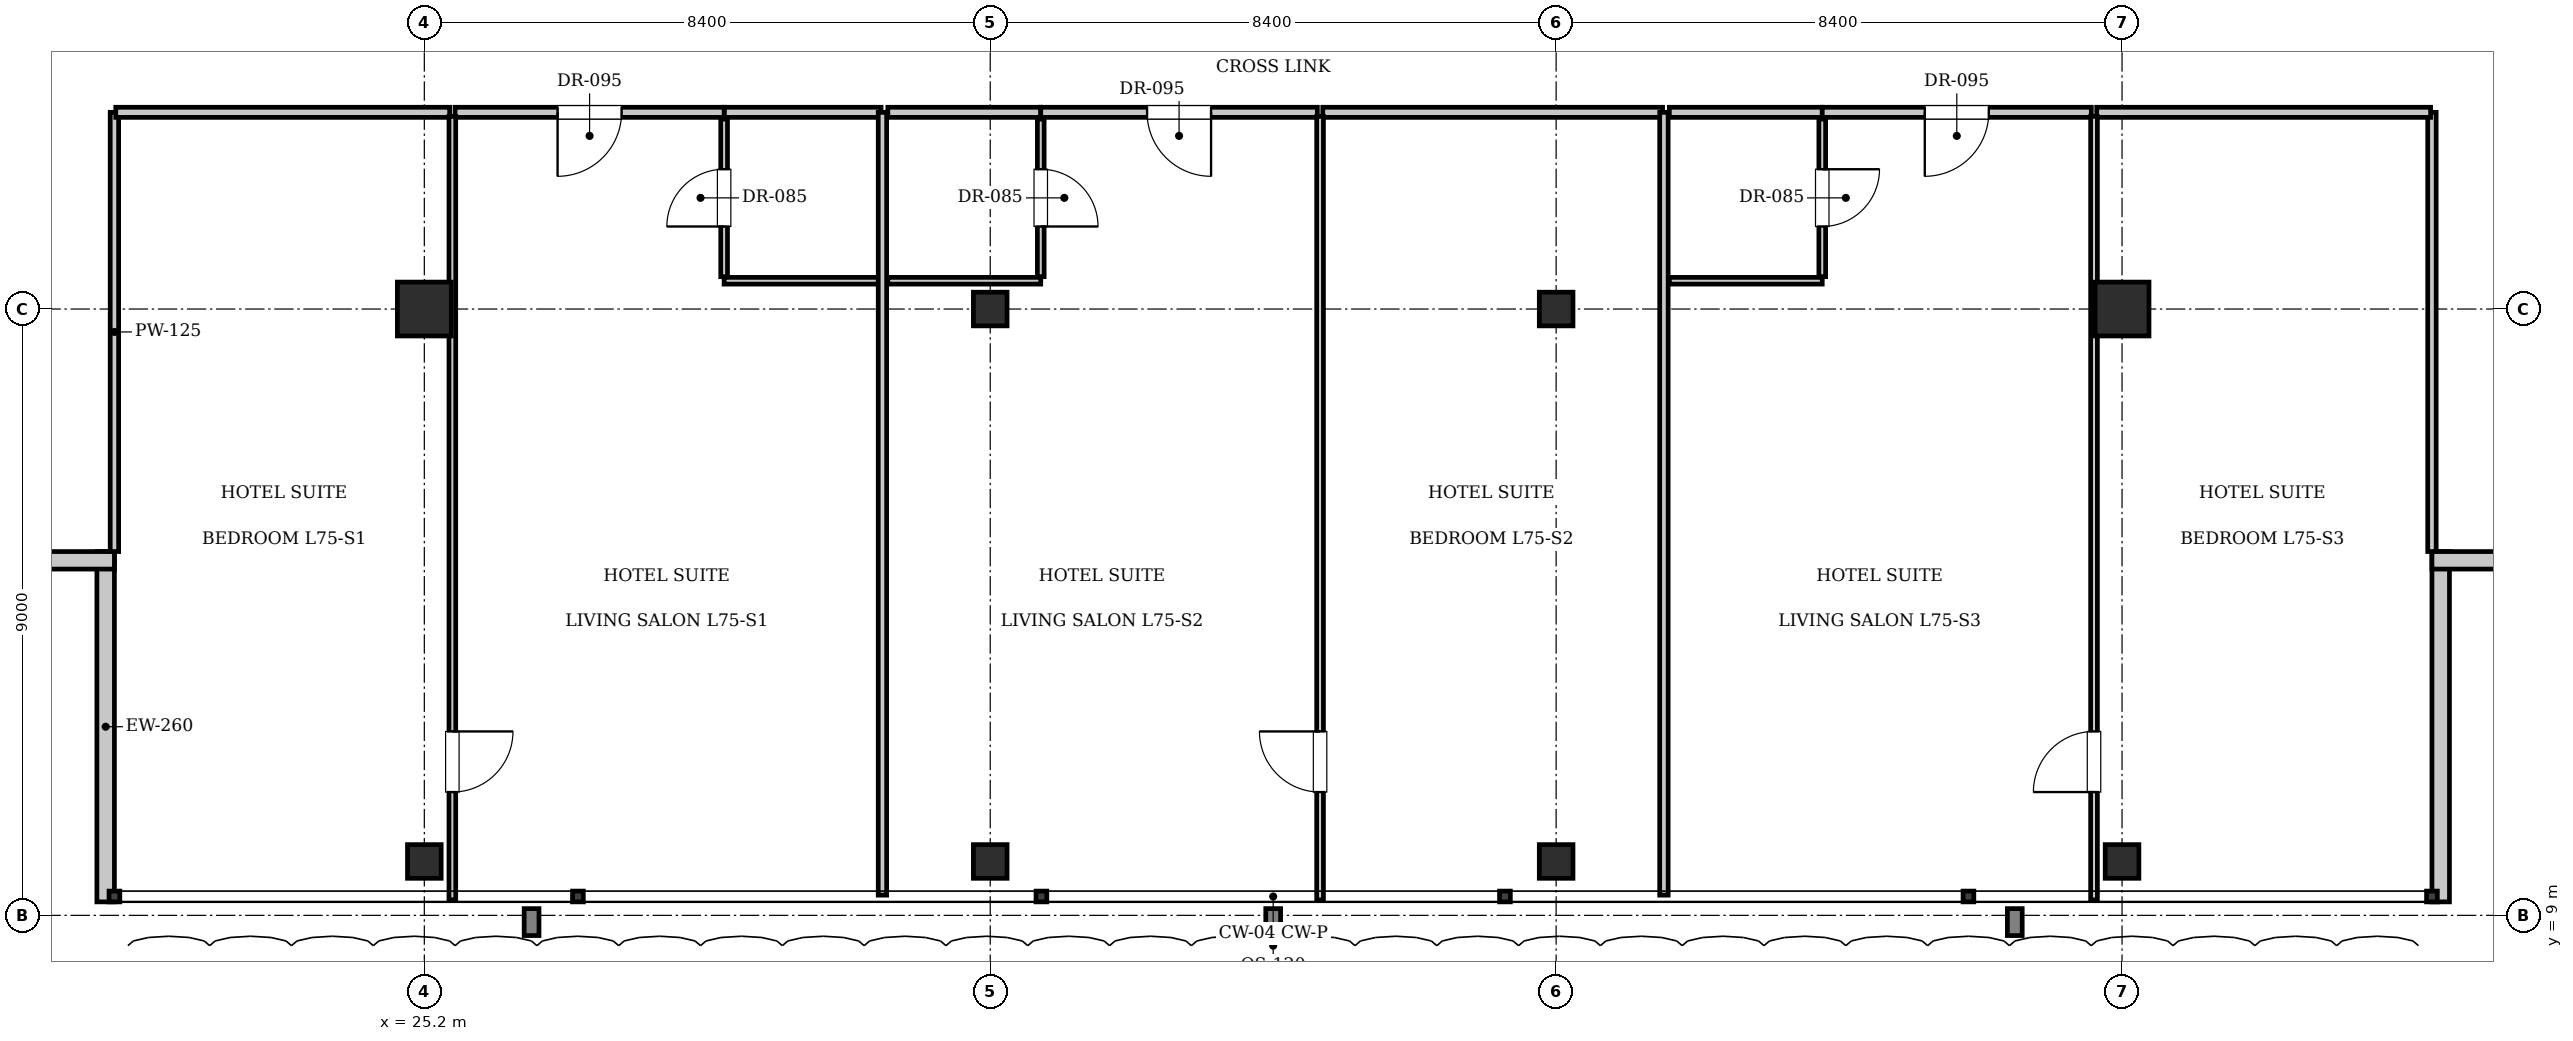
"""IFC4 building model, lengths in metres.
Left out: names, types, materials, properties, quantities, classifications, styles, units other than length and angle.
Written with IfcOpenShell. Run it as: python <this file> out.ifc"""

import sys

from ifc_helpers import new_model, si_unit, direction, frame, frame_2d, origin, origin_2d, place, context, subcontext, project, spatial, rectangle, i_section, extrude, element, fill, save


model = new_model("IFC4")
c1 = context("Model", 3, precision=1e-05, world=origin(), true_north=direction((0.0, 1.0)))
c2 = subcontext(c1, "Body", "Model", "MODEL_VIEW")
j1 = project(units=[si_unit("LENGTHUNIT", "METRE"), si_unit("PLANEANGLEUNIT", "RADIAN")], contexts=[c1])
p1 = place(None, origin())
s1 = spatial("IfcSite", under=j1, at=p1, CompositionType="ELEMENT")
p2 = place(p1, origin())
s2 = spatial("IfcBuilding", under=s1, at=p2, CompositionType="ELEMENT")
p3 = place(p2, frame((0.0, 0.0, 304.85)))
s3 = spatial("IfcBuildingStorey", under=s2, at=p3, CompositionType="ELEMENT", Elevation=304.85)
for number, where, z_axis, x_axis in (
    (1, (25.2, 18.0, 0.0), (0.0, 0.0, 1.0), (1.0, 0.0, 0.0)),
    (2, (50.4, 18.0, 0.0), (0.0, 0.0, 1.0), (1.0, 0.0, 0.0)),
):
    element("IfcColumn", number, at=place(p3, frame(where, z_axis=z_axis, x_axis=x_axis)), inside=s3, PredefinedType="COLUMN", context=c2, shape_type="SweptSolid", body=[
        extrude(rectangle(XDim=0.8, YDim=0.8, at=origin_2d()), origin(), (0.0, 0.0, 1.0), 3.85),
    ])
for number, where, z_axis, x_axis in (
    (3, (33.6, 18.0, 0.0), (0.0, 0.0, 1.0), (1.0, 0.0, 0.0)),
    (4, (42.0, 18.0, 0.0), (0.0, 0.0, 1.0), (1.0, 0.0, 0.0)),
    (5, (25.2, 9.8, 0.0), (0.0, 0.0, 1.0), (1.0, 0.0, 0.0)),
    (6, (33.6, 9.8, 0.0), (0.0, 0.0, 1.0), (1.0, 0.0, 0.0)),
    (7, (42.0, 9.8, 0.0), (0.0, 0.0, 1.0), (1.0, 0.0, 0.0)),
    (8, (50.4, 9.8, 0.0), (0.0, 0.0, 1.0), (1.0, 0.0, 0.0)),
):
    element("IfcColumn", number, at=place(p3, frame(where, z_axis=z_axis, x_axis=x_axis)), inside=s3, PredefinedType="COLUMN", context=c2, shape_type="SweptSolid", body=[
        extrude(i_section(OverallWidth=0.5, OverallDepth=0.5, WebThickness=0.022, FlangeThickness=0.032, at=origin_2d()), origin(), (0.0, 0.0, 1.0), 3.85),
    ])
p4 = place(p3, frame((20.47, 9.2, 0.0), z_axis=(0.0, 0.0, 1.0), x_axis=(0.0, 1.0, 0.0)))
e9 = element("IfcWall", 9, at=p4, inside=s3, PredefinedType="SOLIDWALL", context=c2, shape_type="SweptSolid", body=[
    extrude(rectangle(XDim=5.2, YDim=0.26, at=frame_2d((2.6, 0.0))), origin(), (0.0, 0.0, 1.0), 3.61),
])
p5 = place(p3, frame((20.6, 14.27, 0.0), z_axis=(0.0, 0.0, 1.0), x_axis=(-1.0, 0.0, 0.0)))
e10 = element("IfcWall", 10, at=p5, inside=s3, PredefinedType="SOLIDWALL", context=c2, shape_type="SweptSolid", body=[
    extrude(rectangle(XDim=5.2, YDim=0.26, at=frame_2d((2.6, 0.0))), origin(), (0.0, 0.0, 1.0), 3.61),
])
p6 = place(p5, frame((1.6, 0.0, 0.9)))
e11 = element("IfcOpeningElement", 11, at=p6, cuts=e10, PredefinedType="OPENING", context=c2, shape_type="SweptSolid", body=[
    extrude(rectangle(XDim=2.0, YDim=2.2, at=frame_2d((1.0, 1.1))), frame((0.0, 0.14, 0.0), z_axis=(0.0, -1.0, 0.0), x_axis=(1.0, 0.0, 0.0)), (0.0, 0.0, 1.0), 0.28),
])
p7 = place(p3, frame((55.13, 14.4, 0.0), z_axis=(0.0, 0.0, 1.0), x_axis=(0.0, -1.0, 0.0)))
e12 = element("IfcWall", 12, at=p7, inside=s3, PredefinedType="SOLIDWALL", context=c2, shape_type="SweptSolid", body=[
    extrude(rectangle(XDim=5.2, YDim=0.26, at=frame_2d((2.6, 0.0))), origin(), (0.0, 0.0, 1.0), 3.61),
])
p8 = place(p3, frame((60.2, 14.27, 0.0), z_axis=(0.0, 0.0, 1.0), x_axis=(-1.0, 0.0, 0.0)))
e13 = element("IfcWall", 13, at=p8, inside=s3, PredefinedType="SOLIDWALL", context=c2, shape_type="SweptSolid", body=[
    extrude(rectangle(XDim=5.2, YDim=0.26, at=frame_2d((2.6, 0.0))), origin(), (0.0, 0.0, 1.0), 3.61),
])
p9 = place(p8, frame((1.6, 0.0, 0.9)))
e14 = element("IfcOpeningElement", 14, at=p9, cuts=e13, PredefinedType="OPENING", context=c2, shape_type="SweptSolid", body=[
    extrude(rectangle(XDim=2.0, YDim=2.2, at=frame_2d((1.0, 1.1))), frame((0.0, 0.14, 0.0), z_axis=(0.0, -1.0, 0.0), x_axis=(1.0, 0.0, 0.0)), (0.0, 0.0, 1.0), 0.28),
])
for number, where, z_axis, x_axis in (
    (15, (20.6, 14.4, 0.0), (0.0, 0.0, 1.0), (0.0, 1.0, 0.0)),
    (16, (55.0, 14.4, 0.0), (0.0, 0.0, 1.0), (0.0, 1.0, 0.0)),
):
    element("IfcWall", number, at=place(p3, frame(where, z_axis=z_axis, x_axis=x_axis)), inside=s3, PredefinedType="PARTITIONING", context=c2, shape_type="SweptSolid", body=[
        extrude(rectangle(XDim=6.52, YDim=0.125, at=frame_2d((3.26, 0.0))), origin(), (0.0, 0.0, 1.0), 3.61),
    ])
p10 = place(p3, frame((29.65, 20.92, 0.0), z_axis=(0.0, 0.0, 1.0), x_axis=(1.0, 0.0, 0.0)))
e17 = element("IfcWall", 17, at=p10, inside=s3, PredefinedType="PARTITIONING", context=c2, shape_type="SweptSolid", body=[
    extrude(rectangle(XDim=2.33, YDim=0.15, at=frame_2d((1.165, 0.0))), origin(), (0.0, 0.0, 1.0), 3.61),
])
p11 = place(p3, frame((29.65, 18.42, 0.0), z_axis=(0.0, 0.0, 1.0), x_axis=(1.0, 0.0, 0.0)))
e18 = element("IfcWall", 18, at=p11, inside=s3, PredefinedType="PARTITIONING", context=c2, shape_type="SweptSolid", body=[
    extrude(rectangle(XDim=2.31, YDim=0.1, at=frame_2d((1.155, 0.0))), origin(), (0.0, 0.0, 1.0), 3.61),
])
p12 = place(p3, frame((29.65, 18.48, 0.0), z_axis=(0.0, 0.0, 1.0), x_axis=(0.0, 1.0, 0.0)))
e19 = element("IfcWall", 19, at=p12, inside=s3, PredefinedType="PARTITIONING", context=c2, shape_type="SweptSolid", body=[
    extrude(rectangle(XDim=2.34, YDim=0.1, at=frame_2d((1.17, 0.0))), origin(), (0.0, 0.0, 1.0), 3.61),
])
p13 = place(p12, frame((0.745, 0.0, 0.0)))
e20 = element("IfcOpeningElement", 20, at=p13, cuts=e19, PredefinedType="OPENING", context=c2, shape_type="SweptSolid", body=[
    extrude(rectangle(XDim=0.85, YDim=2.1, at=frame_2d((0.425, 1.05))), frame((0.0, 0.06, 0.0), z_axis=(0.0, -1.0, 0.0), x_axis=(1.0, 0.0, 0.0)), (0.0, 0.0, 1.0), 0.12),
])
p14 = place(p3, frame((20.62, 20.92, 0.0), z_axis=(0.0, 0.0, 1.0), x_axis=(1.0, 0.0, 0.0)))
e21 = element("IfcWall", 21, at=p14, inside=s3, PredefinedType="PARTITIONING", context=c2, shape_type="SweptSolid", body=[
    extrude(rectangle(XDim=4.956, YDim=0.15, at=frame_2d((2.478, 0.0))), origin(), (0.0, 0.0, 1.0), 3.61),
])
p15 = place(p3, frame((25.656, 20.92, 0.0), z_axis=(0.0, 0.0, 1.0), x_axis=(1.0, 0.0, 0.0)))
e22 = element("IfcWall", 22, at=p15, inside=s3, PredefinedType="PARTITIONING", context=c2, shape_type="SweptSolid", body=[
    extrude(rectangle(XDim=3.994, YDim=0.15, at=frame_2d((1.997, 0.0))), origin(), (0.0, 0.0, 1.0), 3.61),
])
p16 = place(p15, frame((1.522, 0.0, 0.0)))
e23 = element("IfcOpeningElement", 23, at=p16, cuts=e22, PredefinedType="OPENING", context=c2, shape_type="SweptSolid", body=[
    extrude(rectangle(XDim=0.95, YDim=2.15, at=frame_2d((0.475, 1.075))), frame((0.0, 0.085, 0.0), z_axis=(0.0, -1.0, 0.0), x_axis=(1.0, 0.0, 0.0)), (0.0, 0.0, 1.0), 0.17),
])
p17 = place(p3, frame((25.616, 9.23, 0.0), z_axis=(0.0, 0.0, 1.0), x_axis=(0.0, 1.0, 0.0)))
e24 = element("IfcWall", 24, at=p17, inside=s3, PredefinedType="PARTITIONING", context=c2, shape_type="SweptSolid", body=[
    extrude(rectangle(XDim=11.63, YDim=0.1, at=frame_2d((5.815, 0.0))), origin(), (0.0, 0.0, 1.0), 3.61),
])
p18 = place(p17, frame((1.6, 0.0, 0.0)))
e25 = element("IfcOpeningElement", 25, at=p18, cuts=e24, PredefinedType="OPENING", context=c2, shape_type="SweptSolid", body=[
    extrude(rectangle(XDim=0.9, YDim=2.1, at=frame_2d((0.45, 1.05))), frame((0.0, 0.06, 0.0), z_axis=(0.0, -1.0, 0.0), x_axis=(1.0, 0.0, 0.0)), (0.0, 0.0, 1.0), 0.12),
])
p19 = place(p3, frame((32.0, 9.3, 0.0), z_axis=(0.0, 0.0, 1.0), x_axis=(0.0, 1.0, 0.0)))
e26 = element("IfcWall", 26, at=p19, inside=s3, PredefinedType="PARTITIONING", context=c2, shape_type="SweptSolid", body=[
    extrude(rectangle(XDim=11.62, YDim=0.125, at=frame_2d((5.81, 0.0))), origin(), (0.0, 0.0, 1.0), 3.61),
])
p20 = place(p3, frame((32.08, 20.92, 0.0), z_axis=(0.0, 0.0, 1.0), x_axis=(1.0, 0.0, 0.0)))
e27 = element("IfcWall", 27, at=p20, inside=s3, PredefinedType="PARTITIONING", context=c2, shape_type="SweptSolid", body=[
    extrude(rectangle(XDim=2.27, YDim=0.15, at=frame_2d((1.135, 0.0))), origin(), (0.0, 0.0, 1.0), 3.61),
])
p21 = place(p3, frame((32.08, 18.42, 0.0), z_axis=(0.0, 0.0, 1.0), x_axis=(1.0, 0.0, 0.0)))
e28 = element("IfcWall", 28, at=p21, inside=s3, PredefinedType="PARTITIONING", context=c2, shape_type="SweptSolid", body=[
    extrude(rectangle(XDim=2.27, YDim=0.1, at=frame_2d((1.135, 0.0))), origin(), (0.0, 0.0, 1.0), 3.61),
])
p22 = place(p3, frame((34.35, 18.48, 0.0), z_axis=(0.0, 0.0, 1.0), x_axis=(0.0, 1.0, 0.0)))
e29 = element("IfcWall", 29, at=p22, inside=s3, PredefinedType="PARTITIONING", context=c2, shape_type="SweptSolid", body=[
    extrude(rectangle(XDim=2.34, YDim=0.1, at=frame_2d((1.17, 0.0))), origin(), (0.0, 0.0, 1.0), 3.61),
])
p23 = place(p22, frame((0.745, 0.0, 0.0)))
e30 = element("IfcOpeningElement", 30, at=p23, cuts=e29, PredefinedType="OPENING", context=c2, shape_type="SweptSolid", body=[
    extrude(rectangle(XDim=0.85, YDim=2.1, at=frame_2d((0.425, 1.05))), frame((0.0, 0.06, 0.0), z_axis=(0.0, -1.0, 0.0), x_axis=(1.0, 0.0, 0.0)), (0.0, 0.0, 1.0), 0.12),
])
p24 = place(p3, frame((34.35, 20.92, 0.0), z_axis=(0.0, 0.0, 1.0), x_axis=(1.0, 0.0, 0.0)))
e31 = element("IfcWall", 31, at=p24, inside=s3, PredefinedType="PARTITIONING", context=c2, shape_type="SweptSolid", body=[
    extrude(rectangle(XDim=4.106, YDim=0.15, at=frame_2d((2.053, 0.0))), origin(), (0.0, 0.0, 1.0), 3.61),
])
p25 = place(p24, frame((1.578, 0.0, 0.0)))
e32 = element("IfcOpeningElement", 32, at=p25, cuts=e31, PredefinedType="OPENING", context=c2, shape_type="SweptSolid", body=[
    extrude(rectangle(XDim=0.95, YDim=2.15, at=frame_2d((0.475, 1.075))), frame((0.0, 0.085, 0.0), z_axis=(0.0, -1.0, 0.0), x_axis=(1.0, 0.0, 0.0)), (0.0, 0.0, 1.0), 0.17),
])
p26 = place(p3, frame((38.536, 20.92, 0.0), z_axis=(0.0, 0.0, 1.0), x_axis=(1.0, 0.0, 0.0)))
e33 = element("IfcWall", 33, at=p26, inside=s3, PredefinedType="PARTITIONING", context=c2, shape_type="SweptSolid", body=[
    extrude(rectangle(XDim=5.044, YDim=0.15, at=frame_2d((2.522, 0.0))), origin(), (0.0, 0.0, 1.0), 3.61),
])
p27 = place(p3, frame((38.496, 9.23, 0.0), z_axis=(0.0, 0.0, 1.0), x_axis=(0.0, 1.0, 0.0)))
e34 = element("IfcWall", 34, at=p27, inside=s3, PredefinedType="PARTITIONING", context=c2, shape_type="SweptSolid", body=[
    extrude(rectangle(XDim=11.63, YDim=0.1, at=frame_2d((5.815, 0.0))), origin(), (0.0, 0.0, 1.0), 3.61),
])
p28 = place(p27, frame((1.6, 0.0, 0.0)))
e35 = element("IfcOpeningElement", 35, at=p28, cuts=e34, PredefinedType="OPENING", context=c2, shape_type="SweptSolid", body=[
    extrude(rectangle(XDim=0.9, YDim=2.1, at=frame_2d((0.45, 1.05))), frame((0.0, 0.06, 0.0), z_axis=(0.0, -1.0, 0.0), x_axis=(1.0, 0.0, 0.0)), (0.0, 0.0, 1.0), 0.12),
])
p29 = place(p3, frame((43.6, 9.3, 0.0), z_axis=(0.0, 0.0, 1.0), x_axis=(0.0, 1.0, 0.0)))
e36 = element("IfcWall", 36, at=p29, inside=s3, PredefinedType="PARTITIONING", context=c2, shape_type="SweptSolid", body=[
    extrude(rectangle(XDim=11.62, YDim=0.125, at=frame_2d((5.81, 0.0))), origin(), (0.0, 0.0, 1.0), 3.61),
])
p30 = place(p3, frame((43.68, 20.92, 0.0), z_axis=(0.0, 0.0, 1.0), x_axis=(1.0, 0.0, 0.0)))
e37 = element("IfcWall", 37, at=p30, inside=s3, PredefinedType="PARTITIONING", context=c2, shape_type="SweptSolid", body=[
    extrude(rectangle(XDim=2.27, YDim=0.15, at=frame_2d((1.135, 0.0))), origin(), (0.0, 0.0, 1.0), 3.61),
])
p31 = place(p3, frame((43.68, 18.42, 0.0), z_axis=(0.0, 0.0, 1.0), x_axis=(1.0, 0.0, 0.0)))
e38 = element("IfcWall", 38, at=p31, inside=s3, PredefinedType="PARTITIONING", context=c2, shape_type="SweptSolid", body=[
    extrude(rectangle(XDim=2.27, YDim=0.1, at=frame_2d((1.135, 0.0))), origin(), (0.0, 0.0, 1.0), 3.61),
])
p32 = place(p3, frame((45.95, 18.48, 0.0), z_axis=(0.0, 0.0, 1.0), x_axis=(0.0, 1.0, 0.0)))
e39 = element("IfcWall", 39, at=p32, inside=s3, PredefinedType="PARTITIONING", context=c2, shape_type="SweptSolid", body=[
    extrude(rectangle(XDim=2.34, YDim=0.1, at=frame_2d((1.17, 0.0))), origin(), (0.0, 0.0, 1.0), 3.61),
])
p33 = place(p32, frame((0.745, 0.0, 0.0)))
e40 = element("IfcOpeningElement", 40, at=p33, cuts=e39, PredefinedType="OPENING", context=c2, shape_type="SweptSolid", body=[
    extrude(rectangle(XDim=0.85, YDim=2.1, at=frame_2d((0.425, 1.05))), frame((0.0, 0.06, 0.0), z_axis=(0.0, -1.0, 0.0), x_axis=(1.0, 0.0, 0.0)), (0.0, 0.0, 1.0), 0.12),
])
p34 = place(p3, frame((45.95, 20.92, 0.0), z_axis=(0.0, 0.0, 1.0), x_axis=(1.0, 0.0, 0.0)))
e41 = element("IfcWall", 41, at=p34, inside=s3, PredefinedType="PARTITIONING", context=c2, shape_type="SweptSolid", body=[
    extrude(rectangle(XDim=3.994, YDim=0.15, at=frame_2d((1.997, 0.0))), origin(), (0.0, 0.0, 1.0), 3.61),
])
p35 = place(p34, frame((1.522, 0.0, 0.0)))
e42 = element("IfcOpeningElement", 42, at=p35, cuts=e41, PredefinedType="OPENING", context=c2, shape_type="SweptSolid", body=[
    extrude(rectangle(XDim=0.95, YDim=2.15, at=frame_2d((0.475, 1.075))), frame((0.0, 0.085, 0.0), z_axis=(0.0, -1.0, 0.0), x_axis=(1.0, 0.0, 0.0)), (0.0, 0.0, 1.0), 0.17),
])
p36 = place(p3, frame((50.024, 20.92, 0.0), z_axis=(0.0, 0.0, 1.0), x_axis=(1.0, 0.0, 0.0)))
e43 = element("IfcWall", 43, at=p36, inside=s3, PredefinedType="PARTITIONING", context=c2, shape_type="SweptSolid", body=[
    extrude(rectangle(XDim=4.956, YDim=0.15, at=frame_2d((2.478, 0.0))), origin(), (0.0, 0.0, 1.0), 3.61),
])
p37 = place(p3, frame((49.984, 9.23, 0.0), z_axis=(0.0, 0.0, 1.0), x_axis=(0.0, 1.0, 0.0)))
e44 = element("IfcWall", 44, at=p37, inside=s3, PredefinedType="PARTITIONING", context=c2, shape_type="SweptSolid", body=[
    extrude(rectangle(XDim=11.63, YDim=0.1, at=frame_2d((5.815, 0.0))), origin(), (0.0, 0.0, 1.0), 3.61),
])
p38 = place(p37, frame((1.6, 0.0, 0.0)))
e45 = element("IfcOpeningElement", 45, at=p38, cuts=e44, PredefinedType="OPENING", context=c2, shape_type="SweptSolid", body=[
    extrude(rectangle(XDim=0.9, YDim=2.1, at=frame_2d((0.45, 1.05))), frame((0.0, 0.06, 0.0), z_axis=(0.0, -1.0, 0.0), x_axis=(1.0, 0.0, 0.0)), (0.0, 0.0, 1.0), 0.12),
])
p39 = place(p13, origin())
e46 = element("IfcDoor", 46, at=p39, inside=s3, OperationType="SINGLE_SWING_LEFT", PredefinedType="DOOR", context=c2, shape_type="SweptSolid", body=[
    extrude(rectangle(XDim=0.85, YDim=2.1, at=frame_2d((0.425, 1.05))), frame((0.0, 0.025, 0.0), z_axis=(0.0, -1.0, 0.0), x_axis=(1.0, 0.0, 0.0)), (0.0, 0.0, 1.0), 0.05),
])
fill(e20, e46)
p40 = place(p16, frame((0.95, 0.0, 0.0), z_axis=(0.0, 0.0, 1.0), x_axis=(-1.0, 0.0, 0.0)))
e47 = element("IfcDoor", 47, at=p40, inside=s3, OperationType="SINGLE_SWING_RIGHT", PredefinedType="DOOR", context=c2, shape_type="SweptSolid", body=[
    extrude(rectangle(XDim=0.95, YDim=2.15, at=frame_2d((0.475, 1.075))), frame((0.0, 0.025, 0.0), z_axis=(0.0, -1.0, 0.0), x_axis=(1.0, 0.0, 0.0)), (0.0, 0.0, 1.0), 0.05),
])
fill(e23, e47)
p41 = place(p18, frame((0.9, 0.0, 0.0), z_axis=(0.0, 0.0, 1.0), x_axis=(-1.0, 0.0, 0.0)))
e48 = element("IfcDoor", 48, at=p41, inside=s3, OperationType="SINGLE_SWING_LEFT", PredefinedType="DOOR", context=c2, shape_type="SweptSolid", body=[
    extrude(rectangle(XDim=0.9, YDim=2.1, at=frame_2d((0.45, 1.05))), frame((0.0, 0.025, 0.0), z_axis=(0.0, -1.0, 0.0), x_axis=(1.0, 0.0, 0.0)), (0.0, 0.0, 1.0), 0.05),
])
fill(e25, e48)
p42 = place(p23, frame((0.85, 0.0, 0.0), z_axis=(0.0, 0.0, 1.0), x_axis=(-1.0, 0.0, 0.0)))
e49 = element("IfcDoor", 49, at=p42, inside=s3, OperationType="SINGLE_SWING_RIGHT", PredefinedType="DOOR", context=c2, shape_type="SweptSolid", body=[
    extrude(rectangle(XDim=0.85, YDim=2.1, at=frame_2d((0.425, 1.05))), frame((0.0, 0.025, 0.0), z_axis=(0.0, -1.0, 0.0), x_axis=(1.0, 0.0, 0.0)), (0.0, 0.0, 1.0), 0.05),
])
fill(e30, e49)
p43 = place(p25, frame((0.95, 0.0, 0.0), z_axis=(0.0, 0.0, 1.0), x_axis=(-1.0, 0.0, 0.0)))
e50 = element("IfcDoor", 50, at=p43, inside=s3, OperationType="SINGLE_SWING_LEFT", PredefinedType="DOOR", context=c2, shape_type="SweptSolid", body=[
    extrude(rectangle(XDim=0.95, YDim=2.15, at=frame_2d((0.475, 1.075))), frame((0.0, 0.025, 0.0), z_axis=(0.0, -1.0, 0.0), x_axis=(1.0, 0.0, 0.0)), (0.0, 0.0, 1.0), 0.05),
])
fill(e32, e50)
p44 = place(p28, origin())
e51 = element("IfcDoor", 51, at=p44, inside=s3, OperationType="SINGLE_SWING_RIGHT", PredefinedType="DOOR", context=c2, shape_type="SweptSolid", body=[
    extrude(rectangle(XDim=0.9, YDim=2.1, at=frame_2d((0.45, 1.05))), frame((0.0, 0.025, 0.0), z_axis=(0.0, -1.0, 0.0), x_axis=(1.0, 0.0, 0.0)), (0.0, 0.0, 1.0), 0.05),
])
fill(e35, e51)
p45 = place(p33, frame((0.85, 0.0, 0.0), z_axis=(0.0, 0.0, 1.0), x_axis=(-1.0, 0.0, 0.0)))
e52 = element("IfcDoor", 52, at=p45, inside=s3, OperationType="SINGLE_SWING_LEFT", PredefinedType="DOOR", context=c2, shape_type="SweptSolid", body=[
    extrude(rectangle(XDim=0.85, YDim=2.1, at=frame_2d((0.425, 1.05))), frame((0.0, 0.025, 0.0), z_axis=(0.0, -1.0, 0.0), x_axis=(1.0, 0.0, 0.0)), (0.0, 0.0, 1.0), 0.05),
])
fill(e40, e52)
p46 = place(p35, frame((0.95, 0.0, 0.0), z_axis=(0.0, 0.0, 1.0), x_axis=(-1.0, 0.0, 0.0)))
e53 = element("IfcDoor", 53, at=p46, inside=s3, OperationType="SINGLE_SWING_RIGHT", PredefinedType="DOOR", context=c2, shape_type="SweptSolid", body=[
    extrude(rectangle(XDim=0.95, YDim=2.15, at=frame_2d((0.475, 1.075))), frame((0.0, 0.025, 0.0), z_axis=(0.0, -1.0, 0.0), x_axis=(1.0, 0.0, 0.0)), (0.0, 0.0, 1.0), 0.05),
])
fill(e42, e53)
p47 = place(p38, origin())
e54 = element("IfcDoor", 54, at=p47, inside=s3, OperationType="SINGLE_SWING_LEFT", PredefinedType="DOOR", context=c2, shape_type="SweptSolid", body=[
    extrude(rectangle(XDim=0.9, YDim=2.1, at=frame_2d((0.45, 1.05))), frame((0.0, 0.025, 0.0), z_axis=(0.0, -1.0, 0.0), x_axis=(1.0, 0.0, 0.0)), (0.0, 0.0, 1.0), 0.05),
])
fill(e45, e54)
save(model, sys.argv[1])
